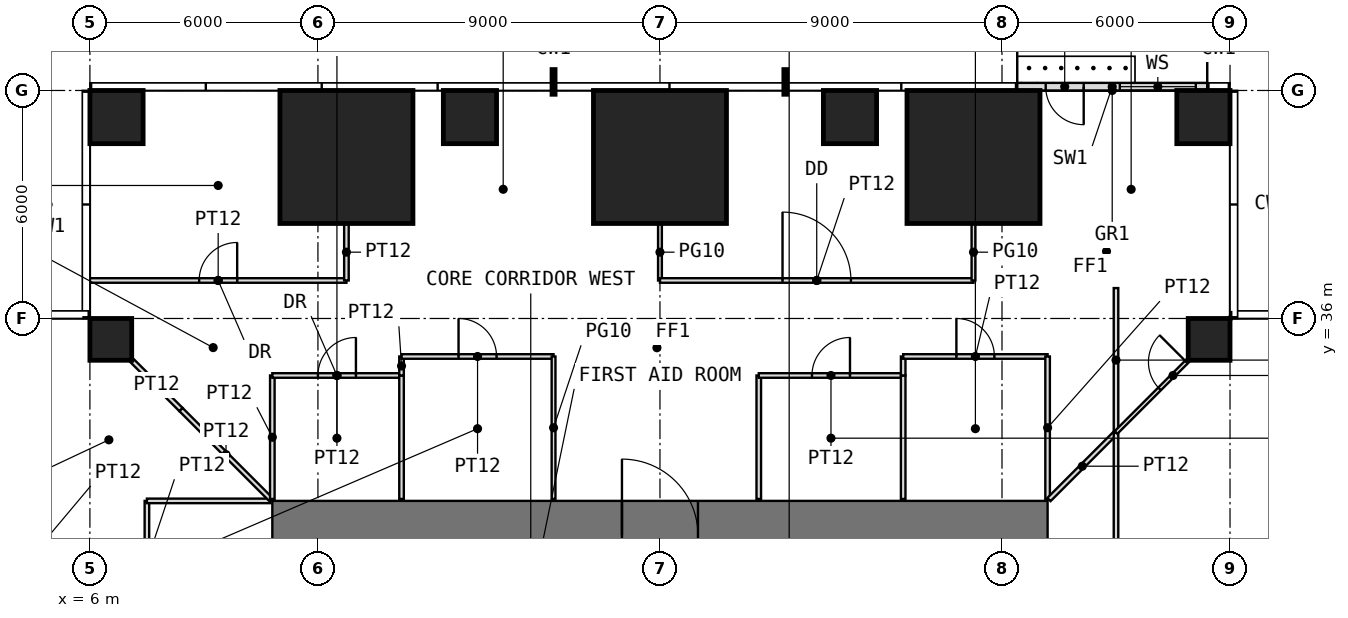
"""IFC4 building model, lengths in metres.
Left out: names, types, materials, properties, quantities, classifications, styles, units other than length and angle.
Written with IfcOpenShell. Run it as: python <this file> out.ifc"""

import sys

from ifc_helpers import new_model, si_unit, direction, frame, frame_2d, origin, origin_2d, place, context, subcontext, project, spatial, rectangle, extrude, element, fill, save


model = new_model("IFC4")
c1 = context("Model", 3, precision=1e-05, world=origin(), true_north=direction((0.0, 1.0)))
c2 = subcontext(c1, "Body", "Model", "MODEL_VIEW")
j1 = project(units=[si_unit("LENGTHUNIT", "METRE"), si_unit("PLANEANGLEUNIT", "RADIAN")], contexts=[c1])
p1 = place(None, origin())
s1 = spatial("IfcSite", under=j1, at=p1, CompositionType="ELEMENT")
p2 = place(p1, origin())
s2 = spatial("IfcBuilding", under=s1, at=p2, CompositionType="ELEMENT")
p3 = place(p2, frame((0.0, 0.0, 30.5)))
s3 = spatial("IfcBuildingStorey", under=s2, at=p3, CompositionType="ELEMENT", Elevation=30.5)
for number, where, z_axis, x_axis in (
    (1, (6.55, 35.45, 0.0), (0.0, 0.0, 1.0), (1.0, 0.0, 0.0)),
    (2, (35.45, 35.45, 0.0), (0.0, 0.0, 1.0), (1.0, 0.0, 0.0)),
):
    element("IfcColumn", number, at=place(p3, frame(where, z_axis=z_axis, x_axis=x_axis)), inside=s3, PredefinedType="COLUMN", context=c2, shape_type="SweptSolid", body=[
        extrude(rectangle(XDim=1.1, YDim=1.1, at=origin_2d()), origin(), (0.0, 0.0, 1.0), 4.0),
    ])
p4 = place(p3, frame((6.7, 41.3, 0.0), z_axis=(0.0, 0.0, 1.0), x_axis=(1.0, 0.0, 0.0)))
e3 = element("IfcColumn", 3, at=p4, inside=s3, PredefinedType="COLUMN", context=c2, shape_type="SweptSolid", body=[
    extrude(rectangle(XDim=1.4, YDim=1.4, at=origin_2d()), origin(), (0.0, 0.0, 1.0), 4.0),
])
p5 = place(p3, frame((12.75, 40.25, 0.0), z_axis=(0.0, 0.0, 1.0), x_axis=(1.0, 0.0, 0.0)))
e4 = element("IfcColumn", 4, at=p5, inside=s3, PredefinedType="COLUMN", context=c2, shape_type="SweptSolid", body=[
    extrude(rectangle(XDim=3.5, YDim=3.5, at=origin_2d()), origin(), (0.0, 0.0, 1.0), 4.0),
])
p6 = place(p3, frame((16.0, 41.3, 0.0), z_axis=(0.0, 0.0, 1.0), x_axis=(1.0, 0.0, 0.0)))
e5 = element("IfcColumn", 5, at=p6, inside=s3, PredefinedType="COLUMN", context=c2, shape_type="SweptSolid", body=[
    extrude(rectangle(XDim=1.4, YDim=1.4, at=origin_2d()), origin(), (0.0, 0.0, 1.0), 4.0),
])
p7 = place(p3, frame((21.0, 40.25, 0.0), z_axis=(0.0, 0.0, 1.0), x_axis=(1.0, 0.0, 0.0)))
e6 = element("IfcColumn", 6, at=p7, inside=s3, PredefinedType="COLUMN", context=c2, shape_type="SweptSolid", body=[
    extrude(rectangle(XDim=3.5, YDim=3.5, at=origin_2d()), origin(), (0.0, 0.0, 1.0), 4.0),
])
p8 = place(p3, frame((26.0, 41.3, 0.0), z_axis=(0.0, 0.0, 1.0), x_axis=(1.0, 0.0, 0.0)))
e7 = element("IfcColumn", 7, at=p8, inside=s3, PredefinedType="COLUMN", context=c2, shape_type="SweptSolid", body=[
    extrude(rectangle(XDim=1.4, YDim=1.4, at=origin_2d()), origin(), (0.0, 0.0, 1.0), 4.0),
])
p9 = place(p3, frame((29.25, 40.25, 0.0), z_axis=(0.0, 0.0, 1.0), x_axis=(1.0, 0.0, 0.0)))
e8 = element("IfcColumn", 8, at=p9, inside=s3, PredefinedType="COLUMN", context=c2, shape_type="SweptSolid", body=[
    extrude(rectangle(XDim=3.5, YDim=3.5, at=origin_2d()), origin(), (0.0, 0.0, 1.0), 4.0),
])
p10 = place(p3, frame((35.3, 41.3, 0.0), z_axis=(0.0, 0.0, 1.0), x_axis=(1.0, 0.0, 0.0)))
e9 = element("IfcColumn", 9, at=p10, inside=s3, PredefinedType="COLUMN", context=c2, shape_type="SweptSolid", body=[
    extrude(rectangle(XDim=1.4, YDim=1.4, at=origin_2d()), origin(), (0.0, 0.0, 1.0), 4.0),
])
p11 = place(p3, frame((35.4, 42.1, 0.0), z_axis=(0.0, 0.0, 1.0), x_axis=(-1.0, 0.0, 0.0)))
e10 = element("IfcWall", 10, at=p11, inside=s3, PredefinedType="USERDEFINED", context=c2, shape_type="SweptSolid", body=[
    extrude(rectangle(XDim=5.0, YDim=0.2, at=frame_2d((2.5, 0.0))), origin(), (0.0, 0.0, 1.0), 3.75),
])
p12 = place(p11, frame((3.25, 0.0, 0.0)))
e11 = element("IfcOpeningElement", 11, at=p12, cuts=e10, PredefinedType="OPENING", context=c2, shape_type="SweptSolid", body=[
    extrude(rectangle(XDim=1.0, YDim=2.4, at=frame_2d((0.5, 1.2))), frame((0.0, 0.11, 0.0), z_axis=(0.0, -1.0, 0.0), x_axis=(1.0, 0.0, 0.0)), (0.0, 0.0, 1.0), 0.22),
])
p13 = place(p11, frame((0.3, 0.0, 0.3)))
e12 = element("IfcOpeningElement", 12, at=p13, cuts=e10, PredefinedType="OPENING", context=c2, shape_type="SweptSolid", body=[
    extrude(rectangle(XDim=2.0, YDim=2.7, at=frame_2d((1.0, 1.35))), frame((0.0, 0.11, 0.0), z_axis=(0.0, -1.0, 0.0), x_axis=(1.0, 0.0, 0.0)), (0.0, 0.0, 1.0), 0.22),
])
p14 = place(p3, frame((10.8, 30.3, -0.05), z_axis=(0.0, 0.0, 1.0), x_axis=(1.0, 0.0, 0.0)))
e13 = element("IfcWall", 13, at=p14, inside=s3, PredefinedType="SHEAR", context=c2, shape_type="SweptSolid", body=[
    extrude(rectangle(XDim=20.4, YDim=1.8, at=frame_2d((10.2, 0.0))), origin(), (0.0, 0.0, 1.0), 4.0),
])
p15 = place(p14, frame((9.2, 0.0, 0.05)))
e14 = element("IfcOpeningElement", 14, at=p15, cuts=e13, PredefinedType="OPENING", context=c2, shape_type="SweptSolid", body=[
    extrude(rectangle(XDim=2.0, YDim=2.2, at=frame_2d((1.0, 1.1))), frame((0.0, 0.91, 0.0), z_axis=(0.0, -1.0, 0.0), x_axis=(1.0, 0.0, 0.0)), (0.0, 0.0, 1.0), 1.82),
])
p16 = place(p3, frame((6.0, 37.0, 0.0), z_axis=(0.0, 0.0, 1.0), x_axis=(1.0, 0.0, 0.0)))
e15 = element("IfcWall", 15, at=p16, inside=s3, PredefinedType="PARTITIONING", context=c2, shape_type="SweptSolid", body=[
    extrude(rectangle(XDim=6.75, YDim=0.12, at=frame_2d((3.375, 0.0))), origin(), (0.0, 0.0, 1.0), 3.75),
])
p17 = place(p16, frame((2.875, 0.0, 0.0)))
e16 = element("IfcOpeningElement", 16, at=p17, cuts=e15, PredefinedType="OPENING", context=c2, shape_type="SweptSolid", body=[
    extrude(rectangle(XDim=1.0, YDim=2.2, at=frame_2d((0.5, 1.1))), frame((0.0, 0.07, 0.0), z_axis=(0.0, -1.0, 0.0), x_axis=(1.0, 0.0, 0.0)), (0.0, 0.0, 1.0), 0.14),
])
p18 = place(p3, frame((7.11, 34.89, 0.0), z_axis=(0.0, 0.0, 1.0), x_axis=(0.707106781187, -0.707106781187, 0.0)))
e17 = element("IfcWall", 17, at=p18, inside=s3, PredefinedType="PARTITIONING", context=c2, shape_type="SweptSolid", body=[
    extrude(rectangle(XDim=1.822, YDim=0.12, at=frame_2d((0.911, 0.0))), origin(), (0.0, 0.0, 1.0), 3.75),
])
p19 = place(p3, frame((7.5, 28.0, 0.0), z_axis=(0.0, 0.0, 1.0), x_axis=(0.0, 1.0, 0.0)))
e18 = element("IfcWall", 18, at=p19, inside=s3, PredefinedType="PARTITIONING", context=c2, shape_type="SweptSolid", body=[
    extrude(rectangle(XDim=3.2, YDim=0.12, at=frame_2d((1.6, 0.0))), origin(), (0.0, 0.0, 1.0), 3.75),
])
p20 = place(p19, frame((1.1, 0.0, 0.0)))
e19 = element("IfcOpeningElement", 19, at=p20, cuts=e18, PredefinedType="OPENING", context=c2, shape_type="SweptSolid", body=[
    extrude(rectangle(XDim=1.0, YDim=2.2, at=frame_2d((0.5, 1.1))), frame((0.0, 0.07, 0.0), z_axis=(0.0, -1.0, 0.0), x_axis=(1.0, 0.0, 0.0)), (0.0, 0.0, 1.0), 0.14),
])
p21 = place(p3, frame((7.5, 31.2, 0.0), z_axis=(0.0, 0.0, 1.0), x_axis=(1.0, 0.0, 0.0)))
e20 = element("IfcWall", 20, at=p21, inside=s3, PredefinedType="PARTITIONING", context=c2, shape_type="SweptSolid", body=[
    extrude(rectangle(XDim=3.25, YDim=0.12, at=frame_2d((1.625, 0.0))), origin(), (0.0, 0.0, 1.0), 3.75),
])
p22 = place(p3, frame((8.398, 33.602, 0.0), z_axis=(0.0, 0.0, 1.0), x_axis=(0.707106781187, -0.707106781187, 0.0)))
e21 = element("IfcWall", 21, at=p22, inside=s3, PredefinedType="PARTITIONING", context=c2, shape_type="SweptSolid", body=[
    extrude(rectangle(XDim=3.346, YDim=0.12, at=frame_2d((1.673, 0.0))), origin(), (0.0, 0.0, 1.0), 3.75),
])
p23 = place(p3, frame((10.8, 31.25, 0.0), z_axis=(0.0, 0.0, 1.0), x_axis=(0.0, 1.0, 0.0)))
e22 = element("IfcWall", 22, at=p23, inside=s3, PredefinedType="PARTITIONING", context=c2, shape_type="SweptSolid", body=[
    extrude(rectangle(XDim=3.25, YDim=0.12, at=frame_2d((1.625, 0.0))), origin(), (0.0, 0.0, 1.0), 3.75),
])
p24 = place(p3, frame((10.8, 34.5, 0.0), z_axis=(0.0, 0.0, 1.0), x_axis=(1.0, 0.0, 0.0)))
e23 = element("IfcWall", 23, at=p24, inside=s3, PredefinedType="PARTITIONING", context=c2, shape_type="SweptSolid", body=[
    extrude(rectangle(XDim=3.4, YDim=0.12, at=frame_2d((1.7, 0.0))), origin(), (0.0, 0.0, 1.0), 3.75),
])
p25 = place(p24, frame((1.2, 0.0, 0.0)))
e24 = element("IfcOpeningElement", 24, at=p25, cuts=e23, PredefinedType="OPENING", context=c2, shape_type="SweptSolid", body=[
    extrude(rectangle(XDim=1.0, YDim=2.2, at=frame_2d((0.5, 1.1))), frame((0.0, 0.07, 0.0), z_axis=(0.0, -1.0, 0.0), x_axis=(1.0, 0.0, 0.0)), (0.0, 0.0, 1.0), 0.14),
])
p26 = place(p3, frame((12.75, 37.0, 0.0), z_axis=(0.0, 0.0, 1.0), x_axis=(0.0, 1.0, 0.0)))
e25 = element("IfcWall", 25, at=p26, inside=s3, PredefinedType="PARTITIONING", context=c2, shape_type="SweptSolid", body=[
    extrude(rectangle(XDim=1.49, YDim=0.12, at=frame_2d((0.745, 0.0))), origin(), (0.0, 0.0, 1.0), 3.75),
])
p27 = place(p3, frame((14.2, 31.25, 0.0), z_axis=(0.0, 0.0, 1.0), x_axis=(0.0, 1.0, 0.0)))
e26 = element("IfcWall", 26, at=p27, inside=s3, PredefinedType="PARTITIONING", context=c2, shape_type="SweptSolid", body=[
    extrude(rectangle(XDim=3.25, YDim=0.12, at=frame_2d((1.625, 0.0))), origin(), (0.0, 0.0, 1.0), 3.75),
])
p28 = place(p3, frame((14.2, 34.5, 0.0), z_axis=(0.0, 0.0, 1.0), x_axis=(0.0, 1.0, 0.0)))
e27 = element("IfcWall", 27, at=p28, inside=s3, PredefinedType="PARTITIONING", context=c2, shape_type="SweptSolid", body=[
    extrude(rectangle(XDim=0.5, YDim=0.12, at=frame_2d((0.25, 0.0))), origin(), (0.0, 0.0, 1.0), 3.75),
])
p29 = place(p3, frame((14.2, 35.0, 0.0), z_axis=(0.0, 0.0, 1.0), x_axis=(1.0, 0.0, 0.0)))
e28 = element("IfcWall", 28, at=p29, inside=s3, PredefinedType="PARTITIONING", context=c2, shape_type="SweptSolid", body=[
    extrude(rectangle(XDim=4.0, YDim=0.12, at=frame_2d((2.0, 0.0))), origin(), (0.0, 0.0, 1.0), 3.75),
])
p30 = place(p29, frame((1.5, 0.0, 0.0)))
e29 = element("IfcOpeningElement", 29, at=p30, cuts=e28, PredefinedType="OPENING", context=c2, shape_type="SweptSolid", body=[
    extrude(rectangle(XDim=1.0, YDim=2.4, at=frame_2d((0.5, 1.2))), frame((0.0, 0.07, 0.0), z_axis=(0.0, -1.0, 0.0), x_axis=(1.0, 0.0, 0.0)), (0.0, 0.0, 1.0), 0.14),
])
p31 = place(p3, frame((18.2, 31.25, 0.0), z_axis=(0.0, 0.0, 1.0), x_axis=(0.0, 1.0, 0.0)))
e30 = element("IfcWall", 30, at=p31, inside=s3, PredefinedType="PARTITIONING", context=c2, shape_type="SweptSolid", body=[
    extrude(rectangle(XDim=3.75, YDim=0.1, at=frame_2d((1.875, 0.0))), origin(), (0.0, 0.0, 1.0), 3.75),
])
p32 = place(p3, frame((21.0, 37.0, 0.0), z_axis=(0.0, 0.0, 1.0), x_axis=(0.0, 1.0, 0.0)))
e31 = element("IfcWall", 31, at=p32, inside=s3, PredefinedType="PARTITIONING", context=c2, shape_type="SweptSolid", body=[
    extrude(rectangle(XDim=1.49, YDim=0.1, at=frame_2d((0.745, 0.0))), origin(), (0.0, 0.0, 1.0), 3.75),
])
p33 = place(p3, frame((21.0, 37.0, 0.0), z_axis=(0.0, 0.0, 1.0), x_axis=(1.0, 0.0, 0.0)))
e32 = element("IfcWall", 32, at=p33, inside=s3, PredefinedType="PARTITIONING", context=c2, shape_type="SweptSolid", body=[
    extrude(rectangle(XDim=8.25, YDim=0.12, at=frame_2d((4.125, 0.0))), origin(), (0.0, 0.0, 1.0), 3.75),
])
p34 = place(p33, frame((3.225, 0.0, 0.0)))
e33 = element("IfcOpeningElement", 33, at=p34, cuts=e32, PredefinedType="OPENING", context=c2, shape_type="SweptSolid", body=[
    extrude(rectangle(XDim=1.8, YDim=2.4, at=frame_2d((0.9, 1.2))), frame((0.0, 0.07, 0.0), z_axis=(0.0, -1.0, 0.0), x_axis=(1.0, 0.0, 0.0)), (0.0, 0.0, 1.0), 0.14),
])
p35 = place(p3, frame((23.6, 31.25, 0.0), z_axis=(0.0, 0.0, 1.0), x_axis=(0.0, 1.0, 0.0)))
e34 = element("IfcWall", 34, at=p35, inside=s3, PredefinedType="PARTITIONING", context=c2, shape_type="SweptSolid", body=[
    extrude(rectangle(XDim=3.25, YDim=0.12, at=frame_2d((1.625, 0.0))), origin(), (0.0, 0.0, 1.0), 3.75),
])
p36 = place(p3, frame((23.6, 34.5, 0.0), z_axis=(0.0, 0.0, 1.0), x_axis=(1.0, 0.0, 0.0)))
e35 = element("IfcWall", 35, at=p36, inside=s3, PredefinedType="PARTITIONING", context=c2, shape_type="SweptSolid", body=[
    extrude(rectangle(XDim=3.8, YDim=0.12, at=frame_2d((1.9, 0.0))), origin(), (0.0, 0.0, 1.0), 3.75),
])
p37 = place(p36, frame((1.4, 0.0, 0.0)))
e36 = element("IfcOpeningElement", 36, at=p37, cuts=e35, PredefinedType="OPENING", context=c2, shape_type="SweptSolid", body=[
    extrude(rectangle(XDim=1.0, YDim=2.2, at=frame_2d((0.5, 1.1))), frame((0.0, 0.07, 0.0), z_axis=(0.0, -1.0, 0.0), x_axis=(1.0, 0.0, 0.0)), (0.0, 0.0, 1.0), 0.14),
])
p38 = place(p3, frame((27.4, 31.25, 0.0), z_axis=(0.0, 0.0, 1.0), x_axis=(0.0, 1.0, 0.0)))
e37 = element("IfcWall", 37, at=p38, inside=s3, PredefinedType="PARTITIONING", context=c2, shape_type="SweptSolid", body=[
    extrude(rectangle(XDim=3.25, YDim=0.12, at=frame_2d((1.625, 0.0))), origin(), (0.0, 0.0, 1.0), 3.75),
])
p39 = place(p3, frame((27.4, 34.5, 0.0), z_axis=(0.0, 0.0, 1.0), x_axis=(0.0, 1.0, 0.0)))
e38 = element("IfcWall", 38, at=p39, inside=s3, PredefinedType="PARTITIONING", context=c2, shape_type="SweptSolid", body=[
    extrude(rectangle(XDim=0.5, YDim=0.12, at=frame_2d((0.25, 0.0))), origin(), (0.0, 0.0, 1.0), 3.75),
])
p40 = place(p3, frame((27.4, 35.0, 0.0), z_axis=(0.0, 0.0, 1.0), x_axis=(1.0, 0.0, 0.0)))
e39 = element("IfcWall", 39, at=p40, inside=s3, PredefinedType="PARTITIONING", context=c2, shape_type="SweptSolid", body=[
    extrude(rectangle(XDim=3.8, YDim=0.12, at=frame_2d((1.9, 0.0))), origin(), (0.0, 0.0, 1.0), 3.75),
])
p41 = place(p40, frame((1.4, 0.0, 0.0)))
e40 = element("IfcOpeningElement", 40, at=p41, cuts=e39, PredefinedType="OPENING", context=c2, shape_type="SweptSolid", body=[
    extrude(rectangle(XDim=1.0, YDim=2.4, at=frame_2d((0.5, 1.2))), frame((0.0, 0.07, 0.0), z_axis=(0.0, -1.0, 0.0), x_axis=(1.0, 0.0, 0.0)), (0.0, 0.0, 1.0), 0.14),
])
p42 = place(p3, frame((29.25, 37.0, 0.0), z_axis=(0.0, 0.0, 1.0), x_axis=(0.0, 1.0, 0.0)))
e41 = element("IfcWall", 41, at=p42, inside=s3, PredefinedType="PARTITIONING", context=c2, shape_type="SweptSolid", body=[
    extrude(rectangle(XDim=1.49, YDim=0.1, at=frame_2d((0.745, 0.0))), origin(), (0.0, 0.0, 1.0), 3.75),
])
p43 = place(p3, frame((31.2, 31.25, 0.0), z_axis=(0.0, 0.0, 1.0), x_axis=(0.0, 1.0, 0.0)))
e42 = element("IfcWall", 42, at=p43, inside=s3, PredefinedType="PARTITIONING", context=c2, shape_type="SweptSolid", body=[
    extrude(rectangle(XDim=3.75, YDim=0.12, at=frame_2d((1.875, 0.0))), origin(), (0.0, 0.0, 1.0), 3.75),
])
p44 = place(p3, frame((31.235, 31.235, 0.0), z_axis=(0.0, 0.0, 1.0), x_axis=(0.707106781187, 0.707106781187, 0.0)))
e43 = element("IfcWall", 43, at=p44, inside=s3, PredefinedType="PARTITIONING", context=c2, shape_type="SweptSolid", body=[
    extrude(rectangle(XDim=2.481, YDim=0.12, at=frame_2d((1.241, 0.0))), origin(), (0.0, 0.0, 1.0), 3.75),
])
p45 = place(p3, frame((33.0, 9.01, 0.0), z_axis=(0.0, 0.0, 1.0), x_axis=(0.0, 1.0, 0.0)))
e44 = element("IfcWall", 44, at=p45, inside=s3, PredefinedType="PARTITIONING", context=c2, shape_type="SweptSolid", body=[
    extrude(rectangle(XDim=23.98, YDim=0.12, at=frame_2d((11.99, 0.0))), origin(), (0.0, 0.0, 1.0), 3.75),
])
p46 = place(p45, frame((11.49, 0.0, 0.0)))
e45 = element("IfcOpeningElement", 45, at=p46, cuts=e44, PredefinedType="OPENING", context=c2, shape_type="SweptSolid", body=[
    extrude(rectangle(XDim=1.0, YDim=2.4, at=frame_2d((0.5, 1.2))), frame((0.0, 0.07, 0.0), z_axis=(0.0, -1.0, 0.0), x_axis=(1.0, 0.0, 0.0)), (0.0, 0.0, 1.0), 0.14),
])
p47 = place(p3, frame((33.0, 33.01, 0.0), z_axis=(0.0, 0.0, 1.0), x_axis=(0.0, 1.0, 0.0)))
e46 = element("IfcWall", 46, at=p47, inside=s3, PredefinedType="PARTITIONING", context=c2, shape_type="SweptSolid", body=[
    extrude(rectangle(XDim=3.79, YDim=0.12, at=frame_2d((1.895, 0.0))), origin(), (0.0, 0.0, 1.0), 3.75),
])
p48 = place(p3, frame((33.0, 33.0, 0.0), z_axis=(0.0, 0.0, 1.0), x_axis=(0.707106781187, 0.707106781187, 0.0)))
e47 = element("IfcWall", 47, at=p48, inside=s3, PredefinedType="PARTITIONING", context=c2, shape_type="SweptSolid", body=[
    extrude(rectangle(XDim=4.243, YDim=0.1, at=frame_2d((2.121, 0.0))), origin(), (0.0, 0.0, 1.0), 3.75),
])
p49 = place(p48, frame((1.621, 0.0, 0.0)))
e48 = element("IfcOpeningElement", 48, at=p49, cuts=e47, PredefinedType="OPENING", context=c2, shape_type="SweptSolid", body=[
    extrude(rectangle(XDim=1.0, YDim=2.4, at=frame_2d((0.5, 1.2))), frame((0.0, 0.06, 0.0), z_axis=(0.0, -1.0, 0.0), x_axis=(1.0, 0.0, 0.0)), (0.0, 0.0, 1.0), 0.12),
])
p50 = place(p12, origin())
e49 = element("IfcDoor", 49, at=p50, inside=s3, OperationType="SINGLE_SWING_LEFT", PredefinedType="DOOR", context=c2, shape_type="SweptSolid", body=[
    extrude(rectangle(XDim=1.0, YDim=2.4, at=frame_2d((0.5, 1.2))), frame((0.0, 0.025, 0.0), z_axis=(0.0, -1.0, 0.0), x_axis=(1.0, 0.0, 0.0)), (0.0, 0.0, 1.0), 0.05),
])
fill(e11, e49)
p51 = place(p13, origin())
e50 = element("IfcWindow", 50, at=p51, inside=s3, PartitioningType="SINGLE_PANEL", PredefinedType="WINDOW", context=c2, shape_type="SweptSolid", body=[
    extrude(rectangle(XDim=2.0, YDim=2.7, at=frame_2d((1.0, 1.35))), frame((0.0, 0.03, 0.0), z_axis=(0.0, -1.0, 0.0), x_axis=(1.0, 0.0, 0.0)), (0.0, 0.0, 1.0), 0.06),
])
fill(e12, e50)
p52 = place(p15, origin())
e51 = element("IfcDoor", 51, at=p52, inside=s3, OperationType="DOUBLE_DOOR_SINGLE_SWING", PredefinedType="DOOR", context=c2, shape_type="SweptSolid", body=[
    extrude(rectangle(XDim=2.0, YDim=2.2, at=frame_2d((1.0, 1.1))), frame((0.0, 0.025, 0.0), z_axis=(0.0, -1.0, 0.0), x_axis=(1.0, 0.0, 0.0)), (0.0, 0.0, 1.0), 0.05),
])
fill(e14, e51)
p53 = place(p25, origin())
e52 = element("IfcDoor", 52, at=p53, inside=s3, OperationType="SINGLE_SWING_RIGHT", PredefinedType="DOOR", context=c2, shape_type="SweptSolid", body=[
    extrude(rectangle(XDim=1.0, YDim=2.2, at=frame_2d((0.5, 1.1))), frame((0.0, 0.025, 0.0), z_axis=(0.0, -1.0, 0.0), x_axis=(1.0, 0.0, 0.0)), (0.0, 0.0, 1.0), 0.05),
])
fill(e24, e52)
p54 = place(p30, origin())
e53 = element("IfcDoor", 53, at=p54, inside=s3, OperationType="SINGLE_SWING_LEFT", PredefinedType="DOOR", context=c2, shape_type="SweptSolid", body=[
    extrude(rectangle(XDim=1.0, YDim=2.4, at=frame_2d((0.5, 1.2))), frame((0.0, 0.025, 0.0), z_axis=(0.0, -1.0, 0.0), x_axis=(1.0, 0.0, 0.0)), (0.0, 0.0, 1.0), 0.05),
])
fill(e29, e53)
p55 = place(p37, origin())
e54 = element("IfcDoor", 54, at=p55, inside=s3, OperationType="SINGLE_SWING_RIGHT", PredefinedType="DOOR", context=c2, shape_type="SweptSolid", body=[
    extrude(rectangle(XDim=1.0, YDim=2.2, at=frame_2d((0.5, 1.1))), frame((0.0, 0.025, 0.0), z_axis=(0.0, -1.0, 0.0), x_axis=(1.0, 0.0, 0.0)), (0.0, 0.0, 1.0), 0.05),
])
fill(e36, e54)
p56 = place(p41, origin())
e55 = element("IfcDoor", 55, at=p56, inside=s3, OperationType="SINGLE_SWING_LEFT", PredefinedType="DOOR", context=c2, shape_type="SweptSolid", body=[
    extrude(rectangle(XDim=1.0, YDim=2.4, at=frame_2d((0.5, 1.2))), frame((0.0, 0.025, 0.0), z_axis=(0.0, -1.0, 0.0), x_axis=(1.0, 0.0, 0.0)), (0.0, 0.0, 1.0), 0.05),
])
fill(e40, e55)
p57 = place(p17, origin())
e56 = element("IfcDoor", 56, at=p57, inside=s3, OperationType="SINGLE_SWING_RIGHT", PredefinedType="DOOR", context=c2, shape_type="SweptSolid", body=[
    extrude(rectangle(XDim=1.0, YDim=2.2, at=frame_2d((0.5, 1.1))), frame((0.0, 0.025, 0.0), z_axis=(0.0, -1.0, 0.0), x_axis=(1.0, 0.0, 0.0)), (0.0, 0.0, 1.0), 0.05),
])
fill(e16, e56)
p58 = place(p34, origin())
e57 = element("IfcDoor", 57, at=p58, inside=s3, OperationType="DOUBLE_DOOR_SINGLE_SWING", PredefinedType="DOOR", context=c2, shape_type="SweptSolid", body=[
    extrude(rectangle(XDim=1.8, YDim=2.4, at=frame_2d((0.9, 1.2))), frame((0.0, 0.025, 0.0), z_axis=(0.0, -1.0, 0.0), x_axis=(1.0, 0.0, 0.0)), (0.0, 0.0, 1.0), 0.05),
])
fill(e33, e57)
p59 = place(p49, origin())
e58 = element("IfcDoor", 58, at=p59, inside=s3, OperationType="SINGLE_SWING_RIGHT", PredefinedType="DOOR", context=c2, shape_type="SweptSolid", body=[
    extrude(rectangle(XDim=1.0, YDim=2.4, at=frame_2d((0.5, 1.2))), frame((0.0, 0.025, 0.0), z_axis=(0.0, -1.0, 0.0), x_axis=(1.0, 0.0, 0.0)), (0.0, 0.0, 1.0), 0.05),
])
fill(e48, e58)
save(model, sys.argv[1])
